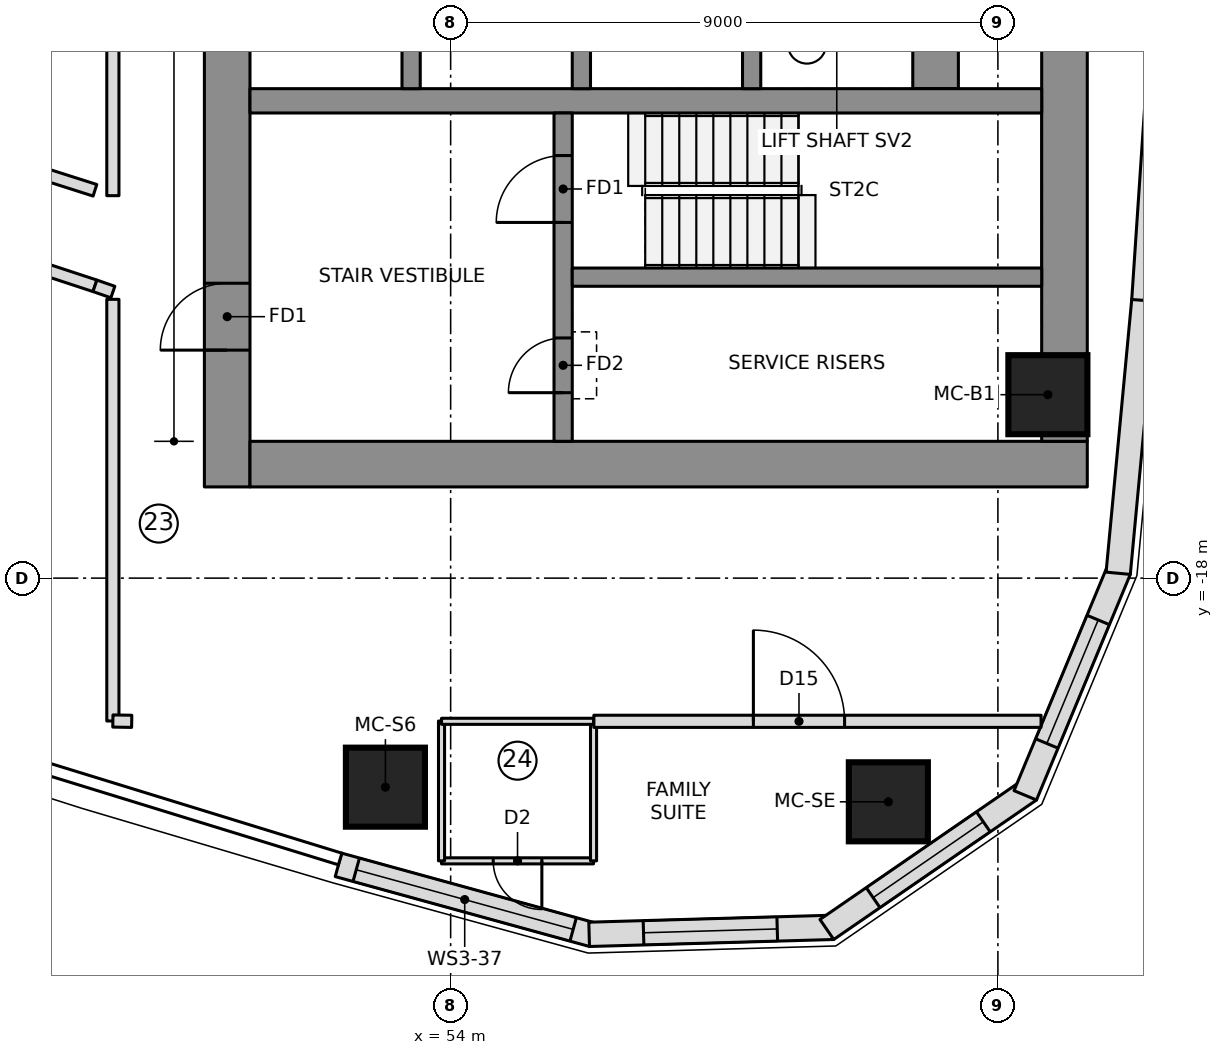
"""IFC4 building model, lengths in metres.
Left out: names, types, materials, properties, quantities, classifications, styles, units other than length and angle.
Written with IfcOpenShell. Run it as: python <this file> out.ifc"""

import sys

from ifc_helpers import new_model, si_unit, direction, frame, frame_2d, origin, origin_2d, place, context, subcontext, project, spatial, polyline, rectangle, outline, extrude, element, fill, save


model = new_model("IFC4")
c1 = context("Model", 3, precision=1e-05, world=origin(), true_north=direction((0.0, 1.0)))
c2 = subcontext(c1, "Body", "Model", "MODEL_VIEW")
j1 = project(units=[si_unit("LENGTHUNIT", "METRE"), si_unit("PLANEANGLEUNIT", "RADIAN")], contexts=[c1])
p1 = place(None, origin())
s1 = spatial("IfcSite", under=j1, at=p1, CompositionType="ELEMENT")
p2 = place(p1, origin())
s2 = spatial("IfcBuilding", under=s1, at=p2, CompositionType="ELEMENT")
p3 = place(p2, frame((0.0, 0.0, 203.9)))
s3 = spatial("IfcBuildingStorey", under=s2, at=p3, CompositionType="ELEMENT", Elevation=203.9)
p4 = place(p3, frame((50.325, -16.5, 0.0), z_axis=(0.0, 0.0, 1.0), x_axis=(0.0, 1.0, 0.0)))
e1 = element("IfcWall", 1, at=p4, inside=s3, PredefinedType="SHEAR", context=c2, shape_type="SweptSolid", body=[
    extrude(rectangle(XDim=9.85, YDim=0.75, at=frame_2d((4.925, 0.0))), origin(), (0.0, 0.0, 1.0), 3.55),
])
p5 = place(p4, frame((2.25, 0.0, 0.0)))
e2 = element("IfcOpeningElement", 2, at=p5, cuts=e1, PredefinedType="OPENING", context=c2, shape_type="SweptSolid", body=[
    extrude(rectangle(XDim=1.1, YDim=2.1, at=frame_2d((0.55, 1.05))), frame((0.0, 0.385, 0.0), z_axis=(0.0, -1.0, 0.0), x_axis=(1.0, 0.0, 0.0)), (0.0, 0.0, 1.0), 0.77),
])
p6 = place(p3, frame((50.7, -16.125, 0.0), z_axis=(0.0, 0.0, 1.0), x_axis=(1.0, 0.0, 0.0)))
e3 = element("IfcWall", 3, at=p6, inside=s3, PredefinedType="SHEAR", context=c2, shape_type="SweptSolid", body=[
    extrude(rectangle(XDim=13.77, YDim=0.75, at=frame_2d((6.885, 0.0))), origin(), (0.0, 0.0, 1.0), 3.55),
])
p7 = place(p3, frame((64.095, -15.75, 0.0), z_axis=(0.0, 0.0, 1.0), x_axis=(0.0, 1.0, 0.0)))
e4 = element("IfcWall", 4, at=p7, inside=s3, PredefinedType="SHEAR", context=c2, shape_type="SweptSolid", body=[
    extrude(rectangle(XDim=7.651, YDim=0.75, at=frame_2d((3.825, 0.0))), origin(), (0.0, 0.0, 1.0), 3.55),
])
p8 = place(p3, frame((61.975, -9.95, 0.0), z_axis=(0.0, 0.0, 1.0), x_axis=(0.0, 1.0, 0.0)))
e5 = element("IfcWall", 5, at=p8, inside=s3, PredefinedType="SHEAR", context=c2, shape_type="SweptSolid", body=[
    extrude(rectangle(XDim=19.9, YDim=0.75, at=frame_2d((9.95, 0.0))), origin(), (0.0, 0.0, 1.0), 3.55),
])
p9 = place(p3, frame((50.7, -10.15, 0.0), z_axis=(0.0, 0.0, 1.0), x_axis=(1.0, 0.0, 0.0)))
e6 = element("IfcWall", 6, at=p9, inside=s3, PredefinedType="SHEAR", context=c2, shape_type="SweptSolid", body=[
    extrude(rectangle(XDim=13.02, YDim=0.4, at=frame_2d((6.51, 0.0))), origin(), (0.0, 0.0, 1.0), 3.55),
])
for number, where, z_axis, x_axis in (
    (7, (53.35, -9.95, 0.0), (0.0, 0.0, 1.0), (0.0, 1.0, 0.0)),
    (8, (56.15, -9.95, 0.0), (0.0, 0.0, 1.0), (0.0, 1.0, 0.0)),
    (9, (58.95, -9.95, 0.0), (0.0, 0.0, 1.0), (0.0, 1.0, 0.0)),
):
    element("IfcWall", number, at=place(p3, frame(where, z_axis=z_axis, x_axis=x_axis)), inside=s3, PredefinedType="SHEAR", context=c2, shape_type="SweptSolid", body=[
        extrude(rectangle(XDim=3.0, YDim=0.3, at=frame_2d((1.5, 0.0))), origin(), (0.0, 0.0, 1.0), 3.55),
    ])
p10 = place(p3, frame((55.85, -15.75, 0.0), z_axis=(0.0, 0.0, 1.0), x_axis=(0.0, 1.0, 0.0)))
e10 = element("IfcWall", 10, at=p10, inside=s3, PredefinedType="SHEAR", context=c2, shape_type="SweptSolid", body=[
    extrude(rectangle(XDim=5.4, YDim=0.3, at=frame_2d((2.7, 0.0))), origin(), (0.0, 0.0, 1.0), 3.55),
])
p11 = place(p10, frame((3.6, 0.0, 0.0)))
e11 = element("IfcOpeningElement", 11, at=p11, cuts=e10, PredefinedType="OPENING", context=c2, shape_type="SweptSolid", body=[
    extrude(rectangle(XDim=1.1, YDim=2.1, at=frame_2d((0.55, 1.05))), frame((0.0, 0.16, 0.0), z_axis=(0.0, -1.0, 0.0), x_axis=(1.0, 0.0, 0.0)), (0.0, 0.0, 1.0), 0.32),
])
p12 = place(p10, frame((0.8, 0.0, 0.0)))
e12 = element("IfcOpeningElement", 12, at=p12, cuts=e10, PredefinedType="OPENING", context=c2, shape_type="SweptSolid", body=[
    extrude(rectangle(XDim=0.9, YDim=2.1, at=frame_2d((0.45, 1.05))), frame((0.0, 0.16, 0.0), z_axis=(0.0, -1.0, 0.0), x_axis=(1.0, 0.0, 0.0)), (0.0, 0.0, 1.0), 0.32),
])
p13 = place(p3, frame((56.0, -13.05, 0.0), z_axis=(0.0, 0.0, 1.0), x_axis=(1.0, 0.0, 0.0)))
e13 = element("IfcWall", 13, at=p13, inside=s3, PredefinedType="SHEAR", context=c2, shape_type="SweptSolid", body=[
    extrude(rectangle(XDim=7.72, YDim=0.3, at=frame_2d((3.86, 0.0))), origin(), (0.0, 0.0, 1.0), 3.55),
])
for number, where, z_axis, x_axis in (
    (14, (52.927, -21.438, 0.0), (0.0, 0.0, 1.0), (1.0, 0.0, 0.0)),
    (15, (61.198, -21.679, 0.0), (0.0, 0.0, 1.0), (1.0, 0.0, 0.0)),
    (16, (63.822, -14.983, 0.0), (0.0, 0.0, 1.0), (1.0, 0.0, 0.0)),
):
    element("IfcColumn", number, at=place(p3, frame(where, z_axis=z_axis, x_axis=x_axis)), inside=s3, PredefinedType="COLUMN", context=c2, shape_type="SweptSolid", body=[
        extrude(rectangle(XDim=1.3, YDim=1.3, at=origin_2d()), origin(), (0.0, 0.0, 1.0), 3.55),
    ])
p14 = place(p3, frame((52.155, -22.716, 0.0), z_axis=(0.0, 0.0, 1.0), x_axis=(0.964205755089, -0.265155165617, 0.0)))
e17 = element("IfcWall", 17, at=p14, inside=s3, PredefinedType="NOTDEFINED", context=c2, shape_type="SweptSolid", body=[
    extrude(outline(polyline([(0.0, -0.2), (4.337, -0.2), (4.277, 0.2), (0.0, 0.2), (0.0, -0.2)])), origin(), (0.0, 0.0, 1.0), 3.25),
])
p15 = place(p14, frame((0.303, 0.0, 0.9)))
e18 = element("IfcOpeningElement", 18, at=p15, cuts=e17, PredefinedType="OPENING", context=c2, shape_type="SweptSolid", body=[
    extrude(rectangle(XDim=3.7, YDim=1.8, at=frame_2d((1.85, 0.9))), frame((0.0, 0.21, 0.0), z_axis=(0.0, -1.0, 0.0), x_axis=(1.0, 0.0, 0.0)), (0.0, 0.0, 1.0), 0.42),
])
p16 = place(p3, frame((56.308, -23.858, 0.0), z_axis=(0.0, 0.0, 1.0), x_axis=(0.999587920197, 0.028705222472, 0.0)))
e19 = element("IfcWall", 19, at=p16, inside=s3, PredefinedType="NOTDEFINED", context=c2, shape_type="SweptSolid", body=[
    extrude(outline(polyline([(-0.03, -0.2), (3.989, -0.2), (3.87, 0.2), (0.03, 0.2), (-0.03, -0.2)])), origin(), (0.0, 0.0, 1.0), 3.25),
])
p17 = place(p16, frame((0.865, 0.0, 0.6)))
e20 = element("IfcOpeningElement", 20, at=p17, cuts=e19, PredefinedType="OPENING", context=c2, shape_type="SweptSolid", body=[
    extrude(outline(polyline([(0.0, 1.35), (0.084, 1.771), (0.322, 2.128), (0.679, 2.366), (1.1, 2.45), (1.521, 2.366), (1.878, 2.128), (2.116, 1.771), (2.2, 1.35), (2.2, 1.1), (2.116, 0.679), (1.878, 0.322), (1.521, 0.084), (1.1, 0.0), (0.679, 0.084), (0.322, 0.322), (0.084, 0.679), (0.0, 1.1), (0.0, 1.35)])), frame((0.0, 0.21, 0.0), z_axis=(0.0, -1.0, 0.0), x_axis=(1.0, 0.0, 0.0)), (0.0, 0.0, 1.0), 0.42),
])
p18 = place(p3, frame((60.236, -23.745, 0.0), z_axis=(0.0, 0.0, 1.0), x_axis=(0.823806162588, 0.566871596115, 0.0)))
e21 = element("IfcWall", 21, at=p18, inside=s3, PredefinedType="NOTDEFINED", context=c2, shape_type="SweptSolid", body=[
    extrude(outline(polyline([(-0.059, -0.2), (3.988, -0.2), (3.87, 0.2), (0.059, 0.2), (-0.059, -0.2)])), origin(), (0.0, 0.0, 1.0), 3.25),
])
p19 = place(p18, frame((0.865, 0.0, 0.6)))
e22 = element("IfcOpeningElement", 22, at=p19, cuts=e21, PredefinedType="OPENING", context=c2, shape_type="SweptSolid", body=[
    extrude(outline(polyline([(0.0, 1.35), (0.084, 1.771), (0.322, 2.128), (0.679, 2.366), (1.1, 2.45), (1.521, 2.366), (1.878, 2.128), (2.116, 1.771), (2.2, 1.35), (2.2, 1.1), (2.116, 0.679), (1.878, 0.322), (1.521, 0.084), (1.1, 0.0), (0.679, 0.084), (0.322, 0.322), (0.084, 0.679), (0.0, 1.1), (0.0, 1.35)])), frame((0.0, 0.21, 0.0), z_axis=(0.0, -1.0, 0.0), x_axis=(1.0, 0.0, 0.0)), (0.0, 0.0, 1.0), 0.42),
])
p20 = place(p3, frame((63.472, -21.518, 0.0), z_axis=(0.0, 0.0, 1.0), x_axis=(0.383997619794, 0.923334082547, 0.0)))
e23 = element("IfcWall", 23, at=p20, inside=s3, PredefinedType="NOTDEFINED", context=c2, shape_type="SweptSolid", body=[
    extrude(outline(polyline([(-0.059, -0.2), (3.959, -0.2), (3.899, 0.2), (0.059, 0.2), (-0.059, -0.2)])), origin(), (0.0, 0.0, 1.0), 3.25),
])
p21 = place(p20, frame((0.865, 0.0, 0.6)))
e24 = element("IfcOpeningElement", 24, at=p21, cuts=e23, PredefinedType="OPENING", context=c2, shape_type="SweptSolid", body=[
    extrude(outline(polyline([(0.0, 1.35), (0.084, 1.771), (0.322, 2.128), (0.679, 2.366), (1.1, 2.45), (1.521, 2.366), (1.878, 2.128), (2.116, 1.771), (2.2, 1.35), (2.2, 1.1), (2.116, 0.679), (1.878, 0.322), (1.521, 0.084), (1.1, 0.0), (0.679, 0.084), (0.322, 0.322), (0.084, 0.679), (0.0, 1.1), (0.0, 1.35)])), frame((0.0, 0.21, 0.0), z_axis=(0.0, -1.0, 0.0), x_axis=(1.0, 0.0, 0.0)), (0.0, 0.0, 1.0), 0.42),
])
p22 = place(p3, frame((64.981, -17.89, 0.0), z_axis=(0.0, 0.0, 1.0), x_axis=(0.093605694738, 0.995609348044, 0.0)))
e25 = element("IfcWall", 25, at=p22, inside=s3, PredefinedType="NOTDEFINED", context=c2, shape_type="SweptSolid", body=[
    extrude(outline(polyline([(-0.03, -0.2), (4.484, -0.2), (4.478, 0.2), (0.03, 0.2), (-0.03, -0.2)])), origin(), (0.0, 0.0, 1.0), 3.25),
])
p23 = place(p3, frame((65.401, -13.429, 0.0), z_axis=(0.0, 0.0, 1.0), x_axis=(0.066905935948, 0.997759287471, 0.0)))
e26 = element("IfcWall", 26, at=p23, inside=s3, PredefinedType="NOTDEFINED", context=c2, shape_type="SweptSolid", body=[
    extrude(outline(polyline([(-0.003, -0.2), (4.484, -0.2), (4.478, 0.2), (0.003, 0.2), (-0.003, -0.2)])), origin(), (0.0, 0.0, 1.0), 3.25),
])
p24 = place(p3, frame((56.35, -22.65, 0.0), z_axis=(0.0, 0.0, 1.0), x_axis=(-1.0, 0.0, 0.0)))
e27 = element("IfcWall", 27, at=p24, inside=s3, PredefinedType="PARTITIONING", context=c2, shape_type="SweptSolid", body=[
    extrude(rectangle(XDim=2.5, YDim=0.1, at=frame_2d((1.25, 0.0))), origin(), (0.0, 0.0, 1.0), 3.25),
])
p25 = place(p24, frame((0.85, 0.0, 0.0)))
e28 = element("IfcOpeningElement", 28, at=p25, cuts=e27, PredefinedType="OPENING", context=c2, shape_type="SweptSolid", body=[
    extrude(rectangle(XDim=0.8, YDim=2.1, at=frame_2d((0.4, 1.05))), frame((0.0, 0.06, 0.0), z_axis=(0.0, -1.0, 0.0), x_axis=(1.0, 0.0, 0.0)), (0.0, 0.0, 1.0), 0.12),
])
for number, where, z_axis, x_axis in (
    (29, (53.85, -22.65, 0.0), (0.0, 0.0, 1.0), (0.0, 1.0, 0.0)),
    (30, (56.35, -20.35, 0.0), (0.0, 0.0, 1.0), (0.0, -1.0, 0.0)),
):
    element("IfcWall", number, at=place(p3, frame(where, z_axis=z_axis, x_axis=x_axis)), inside=s3, PredefinedType="PARTITIONING", context=c2, shape_type="SweptSolid", body=[
        extrude(rectangle(XDim=2.3, YDim=0.1, at=frame_2d((1.15, 0.0))), origin(), (0.0, 0.0, 1.0), 3.25),
    ])
p26 = place(p3, frame((56.355, -20.355, 0.0), z_axis=(0.0, 0.0, 1.0), x_axis=(1.0, 0.0, 0.0)))
e31 = element("IfcWall", 31, at=p26, inside=s3, PredefinedType="PARTITIONING", context=c2, shape_type="SweptSolid", body=[
    extrude(rectangle(XDim=7.354, YDim=0.2, at=frame_2d((3.677, 0.0))), origin(), (0.0, 0.0, 1.0), 3.25),
])
p27 = place(p26, frame((2.624, 0.0, 0.0)))
e32 = element("IfcOpeningElement", 32, at=p27, cuts=e31, PredefinedType="OPENING", context=c2, shape_type="SweptSolid", body=[
    extrude(rectangle(XDim=1.5, YDim=2.1, at=frame_2d((0.75, 1.05))), frame((0.0, 0.11, 0.0), z_axis=(0.0, -1.0, 0.0), x_axis=(1.0, 0.0, 0.0)), (0.0, 0.0, 1.0), 0.22),
])
p28 = place(p3, frame((53.85, -20.355, 0.0), z_axis=(0.0, 0.0, 1.0), x_axis=(1.0, 0.0, 0.0)))
e33 = element("IfcWall", 33, at=p28, inside=s3, PredefinedType="PARTITIONING", context=c2, shape_type="SweptSolid", body=[
    extrude(rectangle(XDim=2.5, YDim=0.1, at=frame_2d((1.25, 0.0))), origin(), (0.0, 0.0, 1.0), 3.25),
])
p29 = place(p3, frame((43.026, -11.507, 0.0), z_axis=(0.0, 0.0, 1.0), x_axis=(0.949951949432, -0.312396052744, 0.0)))
e34 = element("IfcWall", 34, at=p29, inside=s3, PredefinedType="PARTITIONING", context=c2, shape_type="SweptSolid", body=[
    extrude(rectangle(XDim=5.394, YDim=0.2, at=frame_2d((2.697, 0.0))), origin(), (0.0, 0.0, 1.0), 3.25),
])
p30 = place(p29, frame((3.05, 0.0, 0.0)))
e35 = element("IfcOpeningElement", 35, at=p30, cuts=e34, PredefinedType="OPENING", context=c2, shape_type="SweptSolid", body=[
    extrude(rectangle(XDim=1.0, YDim=2.1, at=frame_2d((0.5, 1.05))), frame((0.0, 0.11, 0.0), z_axis=(0.0, -1.0, 0.0), x_axis=(1.0, 0.0, 0.0)), (0.0, 0.0, 1.0), 0.22),
])
p31 = place(p3, frame((48.15, -11.621, 0.0), z_axis=(0.0, 0.0, 1.0), x_axis=(-0.952761948983, 0.303718074157, 0.0)))
e36 = element("IfcWall", 36, at=p31, inside=s3, PredefinedType="PARTITIONING", context=c2, shape_type="SweptSolid", body=[
    extrude(rectangle(XDim=1.332, YDim=0.2, at=frame_2d((0.666, 0.0))), origin(), (0.0, 0.0, 1.0), 3.25),
])
p32 = place(p3, frame((48.445, 11.71, 0.0), z_axis=(0.0, 0.0, 1.0), x_axis=(0.0, -1.0, 0.0)))
e37 = element("IfcWall", 37, at=p32, inside=s3, PredefinedType="PARTITIONING", context=c2, shape_type="SweptSolid", body=[
    extrude(rectangle(XDim=23.42, YDim=0.2, at=frame_2d((11.71, 0.0))), origin(), (0.0, 0.0, 1.0), 3.25),
])
p33 = place(p3, frame((48.15, -13.192, 0.0), z_axis=(0.0, 0.0, 1.0), x_axis=(0.944623214561, -0.328156947987, 0.0)))
e38 = element("IfcWall", 38, at=p33, inside=s3, PredefinedType="PARTITIONING", context=c2, shape_type="SweptSolid", body=[
    extrude(rectangle(XDim=0.312, YDim=0.2, at=frame_2d((0.156, 0.0))), origin(), (0.0, 0.0, 1.0), 3.25),
])
p34 = place(p3, frame((48.445, -13.415, 0.0), z_axis=(0.0, 0.0, 1.0), x_axis=(0.0, -1.0, 0.0)))
e39 = element("IfcWall", 39, at=p34, inside=s3, PredefinedType="PARTITIONING", context=c2, shape_type="SweptSolid", body=[
    extrude(rectangle(XDim=6.935, YDim=0.2, at=frame_2d((3.468, 0.0))), origin(), (0.0, 0.0, 1.0), 3.25),
])
p35 = place(p3, frame((48.445, -20.35, 0.0), z_axis=(0.0, 0.0, 1.0), x_axis=(0.999849757003, -0.017333880736, 0.0)))
e40 = element("IfcWall", 40, at=p35, inside=s3, PredefinedType="PARTITIONING", context=c2, shape_type="SweptSolid", body=[
    extrude(rectangle(XDim=0.31, YDim=0.2, at=frame_2d((0.155, 0.0))), origin(), (0.0, 0.0, 1.0), 3.25),
])
p36 = place(p15, origin())
e41 = element("IfcWindow", 41, at=p36, inside=s3, PartitioningType="SINGLE_PANEL", PredefinedType="WINDOW", context=c2, shape_type="SweptSolid", body=[
    extrude(rectangle(XDim=3.7, YDim=1.8, at=frame_2d((1.85, 0.9))), frame((0.0, 0.17, 0.0), z_axis=(0.0, -1.0, 0.0), x_axis=(1.0, 0.0, 0.0)), (0.0, 0.0, 1.0), 0.06),
])
fill(e18, e41)
p37 = place(p17, origin())
e42 = element("IfcWindow", 42, at=p37, inside=s3, PartitioningType="SINGLE_PANEL", PredefinedType="WINDOW", context=c2, shape_type="SweptSolid", body=[
    extrude(outline(polyline([(0.0, 1.35), (0.084, 1.771), (0.322, 2.128), (0.679, 2.366), (1.1, 2.45), (1.521, 2.366), (1.878, 2.128), (2.116, 1.771), (2.2, 1.35), (2.2, 1.1), (2.116, 0.679), (1.878, 0.322), (1.521, 0.084), (1.1, 0.0), (0.679, 0.084), (0.322, 0.322), (0.084, 0.679), (0.0, 1.1), (0.0, 1.35)])), frame((0.0, 0.17, 0.0), z_axis=(0.0, -1.0, 0.0), x_axis=(1.0, 0.0, 0.0)), (0.0, 0.0, 1.0), 0.06),
])
fill(e20, e42)
p38 = place(p19, origin())
e43 = element("IfcWindow", 43, at=p38, inside=s3, PartitioningType="SINGLE_PANEL", PredefinedType="WINDOW", context=c2, shape_type="SweptSolid", body=[
    extrude(outline(polyline([(0.0, 1.35), (0.084, 1.771), (0.322, 2.128), (0.679, 2.366), (1.1, 2.45), (1.521, 2.366), (1.878, 2.128), (2.116, 1.771), (2.2, 1.35), (2.2, 1.1), (2.116, 0.679), (1.878, 0.322), (1.521, 0.084), (1.1, 0.0), (0.679, 0.084), (0.322, 0.322), (0.084, 0.679), (0.0, 1.1), (0.0, 1.35)])), frame((0.0, 0.17, 0.0), z_axis=(0.0, -1.0, 0.0), x_axis=(1.0, 0.0, 0.0)), (0.0, 0.0, 1.0), 0.06),
])
fill(e22, e43)
p39 = place(p21, origin())
e44 = element("IfcWindow", 44, at=p39, inside=s3, PartitioningType="SINGLE_PANEL", PredefinedType="WINDOW", context=c2, shape_type="SweptSolid", body=[
    extrude(outline(polyline([(0.0, 1.35), (0.084, 1.771), (0.322, 2.128), (0.679, 2.366), (1.1, 2.45), (1.521, 2.366), (1.878, 2.128), (2.116, 1.771), (2.2, 1.35), (2.2, 1.1), (2.116, 0.679), (1.878, 0.322), (1.521, 0.084), (1.1, 0.0), (0.679, 0.084), (0.322, 0.322), (0.084, 0.679), (0.0, 1.1), (0.0, 1.35)])), frame((0.0, 0.17, 0.0), z_axis=(0.0, -1.0, 0.0), x_axis=(1.0, 0.0, 0.0)), (0.0, 0.0, 1.0), 0.06),
])
fill(e24, e44)
p40 = place(p25, origin())
e45 = element("IfcDoor", 45, at=p40, inside=s3, OperationType="SINGLE_SWING_LEFT", PredefinedType="DOOR", context=c2, shape_type="SweptSolid", body=[
    extrude(rectangle(XDim=0.8, YDim=2.1, at=frame_2d((0.4, 1.05))), frame((0.0, 0.025, 0.0), z_axis=(0.0, -1.0, 0.0), x_axis=(1.0, 0.0, 0.0)), (0.0, 0.0, 1.0), 0.05),
])
fill(e28, e45)
p41 = place(p27, origin())
e46 = element("IfcDoor", 46, at=p41, inside=s3, OperationType="DOUBLE_DOOR_SINGLE_SWING", PredefinedType="DOOR", context=c2, shape_type="SweptSolid", body=[
    extrude(rectangle(XDim=1.5, YDim=2.1, at=frame_2d((0.75, 1.05))), frame((0.0, 0.025, 0.0), z_axis=(0.0, -1.0, 0.0), x_axis=(1.0, 0.0, 0.0)), (0.0, 0.0, 1.0), 0.05),
])
fill(e32, e46)
p42 = place(p11, origin())
e47 = element("IfcDoor", 47, at=p42, inside=s3, OperationType="SINGLE_SWING_RIGHT", PredefinedType="DOOR", context=c2, shape_type="SweptSolid", body=[
    extrude(rectangle(XDim=1.1, YDim=2.1, at=frame_2d((0.55, 1.05))), frame((0.0, 0.025, 0.0), z_axis=(0.0, -1.0, 0.0), x_axis=(1.0, 0.0, 0.0)), (0.0, 0.0, 1.0), 0.05),
])
fill(e11, e47)
p43 = place(p5, origin())
e48 = element("IfcDoor", 48, at=p43, inside=s3, OperationType="SINGLE_SWING_RIGHT", PredefinedType="DOOR", context=c2, shape_type="SweptSolid", body=[
    extrude(rectangle(XDim=1.1, YDim=2.1, at=frame_2d((0.55, 1.05))), frame((0.0, 0.025, 0.0), z_axis=(0.0, -1.0, 0.0), x_axis=(1.0, 0.0, 0.0)), (0.0, 0.0, 1.0), 0.05),
])
fill(e2, e48)
p44 = place(p12, origin())
e49 = element("IfcDoor", 49, at=p44, inside=s3, OperationType="SINGLE_SWING_LEFT", PredefinedType="DOOR", context=c2, shape_type="SweptSolid", body=[
    extrude(rectangle(XDim=0.9, YDim=2.1, at=frame_2d((0.45, 1.05))), frame((0.0, 0.025, 0.0), z_axis=(0.0, -1.0, 0.0), x_axis=(1.0, 0.0, 0.0)), (0.0, 0.0, 1.0), 0.05),
])
fill(e12, e49)
save(model, sys.argv[1])
